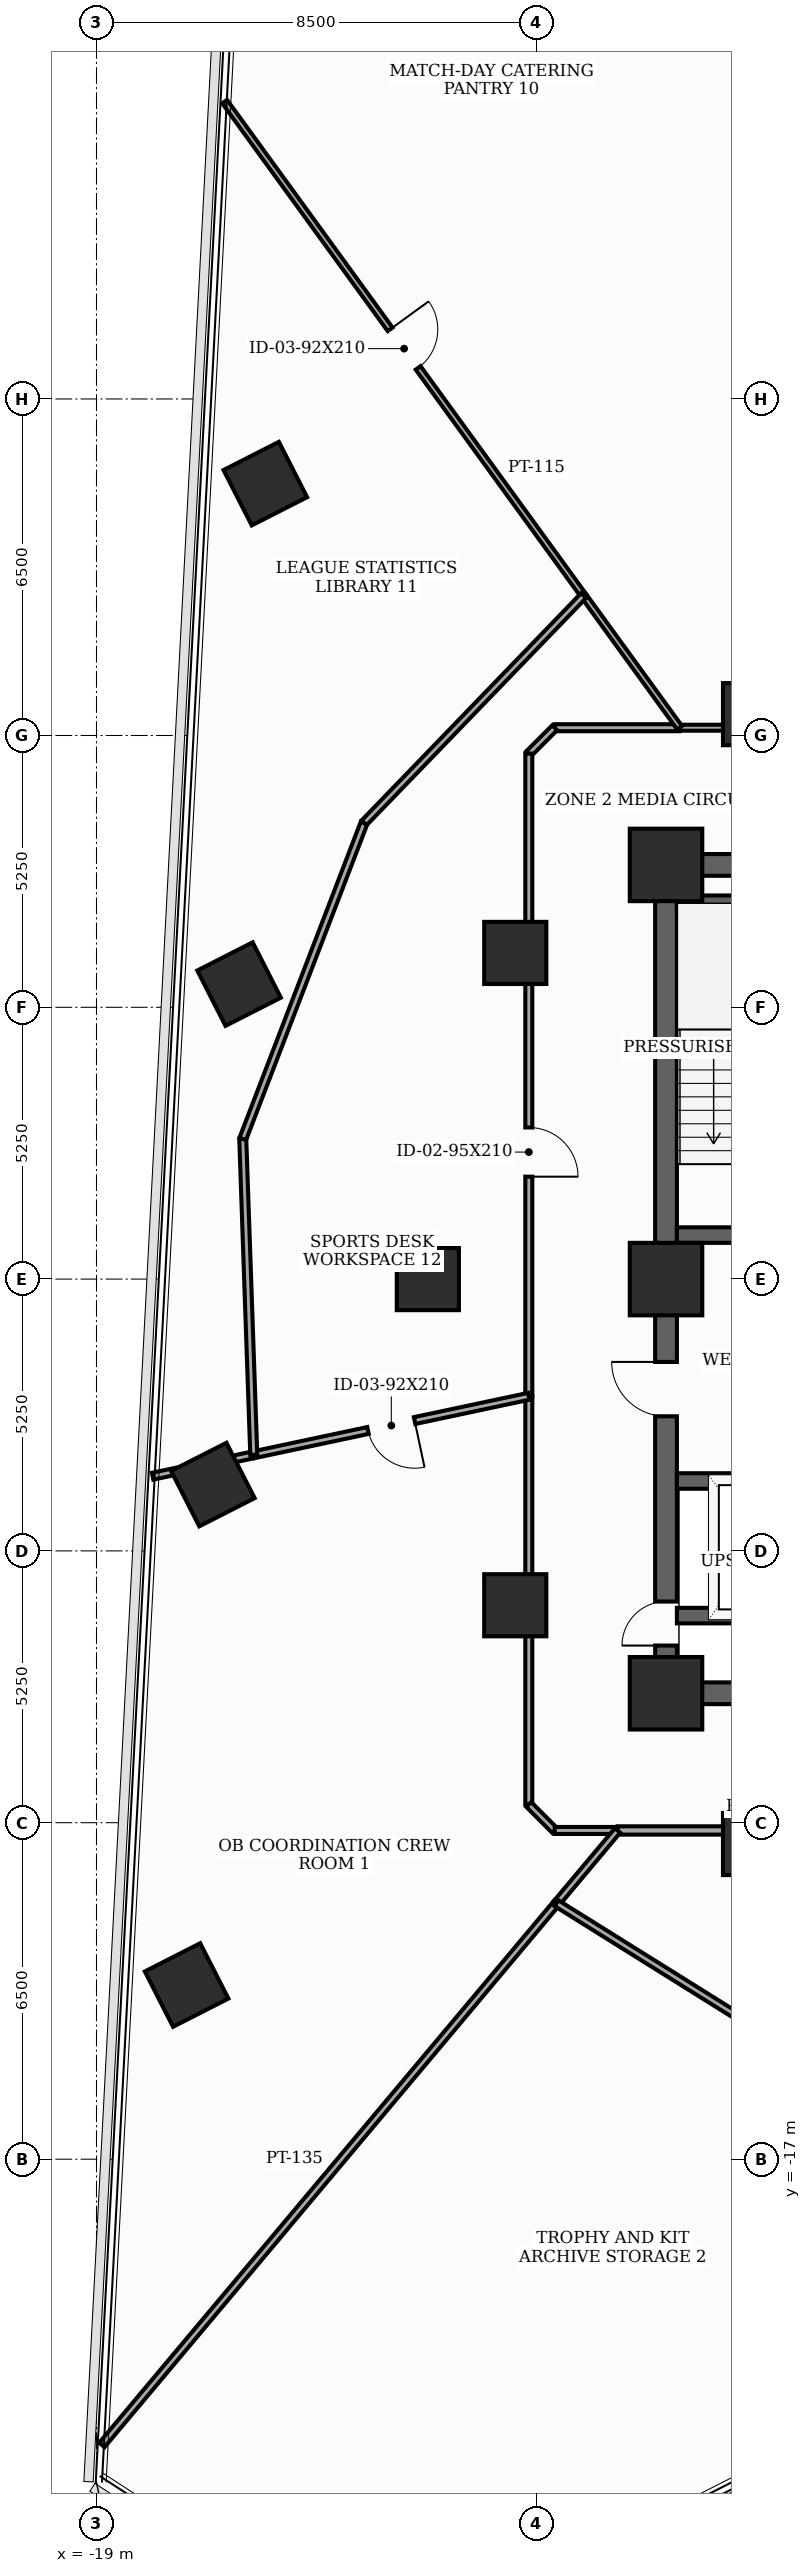
"""IFC4 building model, lengths in metres.
Left out: names, types, materials, properties, quantities, classifications, styles, units other than length and angle.
Written with IfcOpenShell. Run it as: python <this file> out.ifc"""

import sys

from ifc_helpers import new_model, si_unit, direction, frame, frame_2d, origin, origin_2d, place, context, subcontext, project, spatial, rectangle, extrude, element, fill, save


model = new_model("IFC4")
c1 = context("Model", 3, precision=1e-05, world=origin(), true_north=direction((0.0, 1.0)))
c2 = subcontext(c1, "Body", "Model", "MODEL_VIEW")
j1 = project(units=[si_unit("LENGTHUNIT", "METRE"), si_unit("PLANEANGLEUNIT", "RADIAN")], contexts=[c1])
p1 = place(None, origin())
s1 = spatial("IfcSite", under=j1, at=p1, CompositionType="ELEMENT")
p2 = place(p1, origin())
s2 = spatial("IfcBuilding", under=s1, at=p2, CompositionType="ELEMENT")
p3 = place(p2, frame((0.0, 0.0, 127.3)))
s3 = spatial("IfcBuildingStorey", under=s2, at=p3, CompositionType="ELEMENT", Elevation=127.3)
for number, where, z_axis, x_axis in (
    (1, (-8.0, -8.0, 0.0), (0.0, 0.0, 1.0), (1.0, 0.0, 0.0)),
    (2, (-8.0, 8.0, 0.0), (0.0, 0.0, 1.0), (1.0, 0.0, 0.0)),
    (3, (-8.0, 0.0, 0.0), (0.0, 0.0, 1.0), (1.0, 0.0, 0.0)),
):
    element("IfcColumn", number, at=place(p3, frame(where, z_axis=z_axis, x_axis=x_axis)), inside=s3, PredefinedType="COLUMN", context=c2, shape_type="SweptSolid", body=[
        extrude(rectangle(XDim=1.4, YDim=1.4, at=origin_2d()), origin(), (0.0, 0.0, 1.0), 3.7),
    ])
for number, where, z_axis, x_axis in (
    (4, (-6.3, 10.912, 0.0), (0.0, 0.0, 1.0), (1.0, 0.0, 0.0)),
    (5, (-10.912, 6.3, 0.0), (0.0, 0.0, 1.0), (1.0, 0.0, 0.0)),
    (6, (-12.6, 0.0, 0.0), (0.0, 0.0, 1.0), (1.0, 0.0, 0.0)),
    (7, (-10.912, -6.3, 0.0), (0.0, 0.0, 1.0), (1.0, 0.0, 0.0)),
    (8, (-6.3, -10.912, 0.0), (0.0, 0.0, 1.0), (1.0, 0.0, 0.0)),
    (9, (-15.739, 15.365, 0.0), (0.0, 0.0, 1.0), (0.891, 0.454, 0.0)),
    (10, (-16.246, 5.698, 0.0), (0.0, 0.0, 1.0), (0.891, 0.454, 0.0)),
    (11, (-16.752, -3.969, 0.0), (0.0, 0.0, 1.0), (0.891, 0.454, 0.0)),
    (12, (-17.259, -13.635, 0.0), (0.0, 0.0, 1.0), (0.891, 0.454, 0.0)),
):
    element("IfcColumn", number, at=place(p3, frame(where, z_axis=z_axis, x_axis=x_axis)), inside=s3, PredefinedType="COLUMN", context=c2, shape_type="SweptSolid", body=[
        extrude(rectangle(XDim=1.2, YDim=1.2, at=origin_2d()), origin(), (0.0, 0.0, 1.0), 3.7),
    ])
p4 = place(p3, frame((-8.0, -8.0, 0.0), z_axis=(0.0, 0.0, 1.0), x_axis=(0.0, 1.0, 0.0)))
e13 = element("IfcWall", 13, at=p4, inside=s3, PredefinedType="SHEAR", context=c2, shape_type="SweptSolid", body=[
    extrude(rectangle(XDim=16.0, YDim=0.42, at=frame_2d((8.0, 0.0))), origin(), (0.0, 0.0, 1.0), 3.5),
])
p5 = place(p4, frame((0.922, 0.0, 0.0)))
e14 = element("IfcOpeningElement", 14, at=p5, cuts=e13, PredefinedType="OPENING", context=c2, shape_type="SweptSolid", body=[
    extrude(rectangle(XDim=0.85, YDim=2.02, at=frame_2d((0.425, 1.01))), frame((0.0, 0.22, 0.0), z_axis=(0.0, -1.0, 0.0), x_axis=(1.0, 0.0, 0.0)), (0.0, 0.0, 1.0), 0.44),
])
p6 = place(p4, frame((5.35, 0.0, 0.0)))
e15 = element("IfcOpeningElement", 15, at=p6, cuts=e13, PredefinedType="OPENING", context=c2, shape_type="SweptSolid", body=[
    extrude(rectangle(XDim=1.05, YDim=2.15, at=frame_2d((0.525, 1.075))), frame((0.0, 0.22, 0.0), z_axis=(0.0, -1.0, 0.0), x_axis=(1.0, 0.0, 0.0)), (0.0, 0.0, 1.0), 0.44),
])
p7 = place(p3, frame((-8.0, -8.0, 0.0), z_axis=(0.0, 0.0, 1.0), x_axis=(1.0, 0.0, 0.0)))
e16 = element("IfcWall", 16, at=p7, inside=s3, PredefinedType="SHEAR", context=c2, shape_type="SweptSolid", body=[
    extrude(rectangle(XDim=16.0, YDim=0.42, at=frame_2d((8.0, 0.0))), origin(), (0.0, 0.0, 1.0), 3.5),
])
p8 = place(p7, frame((5.2, 0.0, 0.0)))
e17 = element("IfcOpeningElement", 17, at=p8, cuts=e16, PredefinedType="OPENING", context=c2, shape_type="SweptSolid", body=[
    extrude(rectangle(XDim=0.95, YDim=2.1, at=frame_2d((0.475, 1.05))), frame((0.0, 0.22, 0.0), z_axis=(0.0, -1.0, 0.0), x_axis=(1.0, 0.0, 0.0)), (0.0, 0.0, 1.0), 0.44),
])
p9 = place(p7, frame((9.8, 0.0, 0.0)))
e18 = element("IfcOpeningElement", 18, at=p9, cuts=e16, PredefinedType="OPENING", context=c2, shape_type="SweptSolid", body=[
    extrude(rectangle(XDim=0.95, YDim=2.1, at=frame_2d((0.475, 1.05))), frame((0.0, 0.22, 0.0), z_axis=(0.0, -1.0, 0.0), x_axis=(1.0, 0.0, 0.0)), (0.0, 0.0, 1.0), 0.44),
])
p10 = place(p3, frame((-8.0, 8.0, 0.0), z_axis=(0.0, 0.0, 1.0), x_axis=(1.0, 0.0, 0.0)))
e19 = element("IfcWall", 19, at=p10, inside=s3, PredefinedType="SHEAR", context=c2, shape_type="SweptSolid", body=[
    extrude(rectangle(XDim=16.0, YDim=0.42, at=frame_2d((8.0, 0.0))), origin(), (0.0, 0.0, 1.0), 3.5),
])
p11 = place(p10, frame((7.1, 0.0, 0.0)))
e20 = element("IfcOpeningElement", 20, at=p11, cuts=e19, PredefinedType="OPENING", context=c2, shape_type="SweptSolid", body=[
    extrude(rectangle(XDim=1.8, YDim=2.15, at=frame_2d((0.9, 1.075))), frame((0.0, 0.22, 0.0), z_axis=(0.0, -1.0, 0.0), x_axis=(1.0, 0.0, 0.0)), (0.0, 0.0, 1.0), 0.44),
])
p12 = place(p3, frame((-7.79, 0.85, 0.0), z_axis=(0.0, 0.0, 1.0), x_axis=(1.0, 0.0, 0.0)))
e21 = element("IfcWall", 21, at=p12, inside=s3, PredefinedType="SHEAR", context=c2, shape_type="SweptSolid", body=[
    extrude(rectangle(XDim=3.34, YDim=0.3, at=frame_2d((1.67, 0.0))), origin(), (0.0, 0.0, 1.0), 3.5),
])
p13 = place(p12, frame((1.85, 0.0, 0.0)))
e22 = element("IfcOpeningElement", 22, at=p13, cuts=e21, PredefinedType="OPENING", context=c2, shape_type="SweptSolid", body=[
    extrude(rectangle(XDim=1.05, YDim=2.15, at=frame_2d((0.525, 1.075))), frame((0.0, 0.16, 0.0), z_axis=(0.0, -1.0, 0.0), x_axis=(1.0, 0.0, 0.0)), (0.0, 0.0, 1.0), 0.32),
])
p14 = place(p3, frame((-7.79, 7.26, 0.0), z_axis=(0.0, 0.0, 1.0), x_axis=(1.0, 0.0, 0.0)))
e23 = element("IfcWall", 23, at=p14, inside=s3, PredefinedType="SHEAR", context=c2, shape_type="SweptSolid", body=[
    extrude(rectangle(XDim=3.34, YDim=0.3, at=frame_2d((1.67, 0.0))), origin(), (0.0, 0.0, 1.0), 3.5),
])
p15 = place(p3, frame((-7.79, -3.9, 0.0), z_axis=(0.0, 0.0, 1.0), x_axis=(1.0, 0.0, 0.0)))
e24 = element("IfcWall", 24, at=p15, inside=s3, PredefinedType="SHEAR", context=c2, shape_type="SweptSolid", body=[
    extrude(rectangle(XDim=3.34, YDim=0.3, at=frame_2d((1.67, 0.0))), origin(), (0.0, 0.0, 1.0), 3.5),
])
p16 = place(p15, frame((1.27, 0.0, 0.0)))
e25 = element("IfcOpeningElement", 25, at=p16, cuts=e24, PredefinedType="OPENING", context=c2, shape_type="SweptSolid", body=[
    extrude(rectangle(XDim=1.1, YDim=2.1, at=frame_2d((0.55, 1.05))), frame((0.0, 0.16, 0.0), z_axis=(0.0, -1.0, 0.0), x_axis=(1.0, 0.0, 0.0)), (0.0, 0.0, 1.0), 0.32),
])
p17 = place(p3, frame((-7.79, -6.5, 0.0), z_axis=(0.0, 0.0, 1.0), x_axis=(1.0, 0.0, 0.0)))
e26 = element("IfcWall", 26, at=p17, inside=s3, PredefinedType="SHEAR", context=c2, shape_type="SweptSolid", body=[
    extrude(rectangle(XDim=3.34, YDim=0.3, at=frame_2d((1.67, 0.0))), origin(), (0.0, 0.0, 1.0), 3.5),
])
p18 = place(p3, frame((-10.65, -2.264, 0.0), z_axis=(0.0, 0.0, 1.0), x_axis=(0.0, -1.0, 0.0)))
e27 = element("IfcWall", 27, at=p18, inside=s3, PredefinedType="PARTITIONING", context=c2, shape_type="SweptSolid", body=[
    extrude(rectangle(XDim=7.886, YDim=0.135, at=frame_2d((3.943, 0.0))), origin(), (0.0, 0.0, 1.0), 2.785),
])
p19 = place(p3, frame((-10.65, -10.15, 0.0), z_axis=(0.0, 0.0, 1.0), x_axis=(0.707106781187, -0.707106781187, 0.0)))
e28 = element("IfcWall", 28, at=p19, inside=s3, PredefinedType="PARTITIONING", context=c2, shape_type="SweptSolid", body=[
    extrude(rectangle(XDim=0.707, YDim=0.135, at=frame_2d((0.354, 0.0))), origin(), (0.0, 0.0, 1.0), 3.5),
])
p20 = place(p3, frame((-10.15, -10.65, 0.0), z_axis=(0.0, 0.0, 1.0), x_axis=(1.0, 0.0, 0.0)))
e29 = element("IfcWall", 29, at=p20, inside=s3, PredefinedType="PARTITIONING", context=c2, shape_type="SweptSolid", body=[
    extrude(rectangle(XDim=1.214, YDim=0.135, at=frame_2d((0.607, 0.0))), origin(), (0.0, 0.0, 1.0), 3.5),
])
p21 = place(p3, frame((-8.936, -10.65, 0.0), z_axis=(0.0, 0.0, 1.0), x_axis=(1.0, 0.0, 0.0)))
e30 = element("IfcWall", 30, at=p21, inside=s3, PredefinedType="PARTITIONING", context=c2, shape_type="SweptSolid", body=[
    extrude(rectangle(XDim=11.591, YDim=0.16, at=frame_2d((5.795, 0.0))), origin(), (0.0, 0.0, 1.0), 2.785),
])
p22 = place(p21, frame((5.295, 0.0, 0.0)))
e31 = element("IfcOpeningElement", 31, at=p22, cuts=e30, PredefinedType="OPENING", context=c2, shape_type="SweptSolid", body=[
    extrude(rectangle(XDim=1.0, YDim=2.15, at=frame_2d((0.5, 1.075))), frame((0.0, 0.09, 0.0), z_axis=(0.0, -1.0, 0.0), x_axis=(1.0, 0.0, 0.0)), (0.0, 0.0, 1.0), 0.18),
])
p23 = place(p3, frame((-2.264, 10.65, 0.0), z_axis=(0.0, 0.0, 1.0), x_axis=(-1.0, 0.0, 0.0)))
e32 = element("IfcWall", 32, at=p23, inside=s3, PredefinedType="PARTITIONING", context=c2, shape_type="SweptSolid", body=[
    extrude(rectangle(XDim=5.474, YDim=0.115, at=frame_2d((2.737, 0.0))), origin(), (0.0, 0.0, 1.0), 2.785),
])
p24 = place(p23, frame((0.62, 0.0, 0.0)))
e33 = element("IfcOpeningElement", 33, at=p24, cuts=e32, PredefinedType="OPENING", context=c2, shape_type="SweptSolid", body=[
    extrude(rectangle(XDim=0.95, YDim=2.1, at=frame_2d((0.475, 1.05))), frame((0.0, 0.067, 0.0), z_axis=(0.0, -1.0, 0.0), x_axis=(1.0, 0.0, 0.0)), (0.0, 0.0, 1.0), 0.135),
])
p25 = place(p3, frame((-7.738, 10.65, 0.0), z_axis=(0.0, 0.0, 1.0), x_axis=(-1.0, 0.0, 0.0)))
e34 = element("IfcWall", 34, at=p25, inside=s3, PredefinedType="PARTITIONING", context=c2, shape_type="SweptSolid", body=[
    extrude(rectangle(XDim=2.412, YDim=0.135, at=frame_2d((1.206, 0.0))), origin(), (0.0, 0.0, 1.0), 3.5),
])
p26 = place(p3, frame((-10.15, 10.65, 0.0), z_axis=(0.0, 0.0, 1.0), x_axis=(-0.707106781187, -0.707106781187, 0.0)))
e35 = element("IfcWall", 35, at=p26, inside=s3, PredefinedType="PARTITIONING", context=c2, shape_type="SweptSolid", body=[
    extrude(rectangle(XDim=0.707, YDim=0.135, at=frame_2d((0.354, 0.0))), origin(), (0.0, 0.0, 1.0), 3.5),
])
p27 = place(p3, frame((-10.65, 10.15, 0.0), z_axis=(0.0, 0.0, 1.0), x_axis=(0.0, -1.0, 0.0)))
e36 = element("IfcWall", 36, at=p27, inside=s3, PredefinedType="PARTITIONING", context=c2, shape_type="SweptSolid", body=[
    extrude(rectangle(XDim=12.414, YDim=0.135, at=frame_2d((6.207, 0.0))), origin(), (0.0, 0.0, 1.0), 2.785),
])
p28 = place(p27, frame((7.222, 0.0, 0.0)))
e37 = element("IfcOpeningElement", 37, at=p28, cuts=e36, PredefinedType="OPENING", context=c2, shape_type="SweptSolid", body=[
    extrude(rectangle(XDim=0.95, YDim=2.1, at=frame_2d((0.475, 1.05))), frame((0.0, 0.077, 0.0), z_axis=(0.0, -1.0, 0.0), x_axis=(1.0, 0.0, 0.0)), (0.0, 0.0, 1.0), 0.155),
])
p29 = place(p3, frame((-18.896, -22.52, 0.0), z_axis=(0.0, 0.0, 1.0), x_axis=(0.642815636807, 0.766020924698, 0.0)))
e38 = element("IfcWall", 38, at=p29, inside=s3, PredefinedType="PARTITIONING", context=c2, shape_type="SweptSolid", body=[
    extrude(rectangle(XDim=13.661, YDim=0.135, at=frame_2d((6.831, 0.0))), origin(), (0.0, 0.0, 1.0), 2.985),
])
p30 = place(p3, frame((-10.115, -12.055, 0.0), z_axis=(0.0, 0.0, 1.0), x_axis=(0.64278617419, 0.766045647642, 0.0)))
e39 = element("IfcWall", 39, at=p30, inside=s3, PredefinedType="PARTITIONING", context=c2, shape_type="SweptSolid", body=[
    extrude(rectangle(XDim=1.834, YDim=0.135, at=frame_2d((0.917, 0.0))), origin(), (0.0, 0.0, 1.0), 3.5),
])
p31 = place(p3, frame((-15.962, -3.393, 0.0), z_axis=(0.0, 0.0, 1.0), x_axis=(-0.978224349737, -0.207550286874, 0.0)))
e40 = element("IfcWall", 40, at=p31, inside=s3, PredefinedType="PARTITIONING", context=c2, shape_type="SweptSolid", body=[
    extrude(rectangle(XDim=1.997, YDim=0.135, at=frame_2d((0.999, 0.0))), origin(), (0.0, 0.0, 1.0), 2.885),
])
p32 = place(p3, frame((-10.65, -2.264, 0.0), z_axis=(0.0, 0.0, 1.0), x_axis=(-0.978145824013, -0.207920049456, 0.0)))
e41 = element("IfcWall", 41, at=p32, inside=s3, PredefinedType="PARTITIONING", context=c2, shape_type="SweptSolid", body=[
    extrude(rectangle(XDim=5.431, YDim=0.135, at=frame_2d((2.715, 0.0))), origin(), (0.0, 0.0, 1.0), 2.785),
])
p33 = place(p32, frame((2.255, 0.0, 0.0)))
e42 = element("IfcOpeningElement", 42, at=p33, cuts=e41, PredefinedType="OPENING", context=c2, shape_type="SweptSolid", body=[
    extrude(rectangle(XDim=0.92, YDim=2.1, at=frame_2d((0.46, 1.05))), frame((0.0, 0.077, 0.0), z_axis=(0.0, -1.0, 0.0), x_axis=(1.0, 0.0, 0.0)), (0.0, 0.0, 1.0), 0.155),
])
p34 = place(p3, frame((-6.046, -14.597, 0.0), z_axis=(0.0, 0.0, 1.0), x_axis=(-0.848109776096, 0.529820542912, 0.0)))
e43 = element("IfcWall", 43, at=p34, inside=s3, PredefinedType="PARTITIONING", context=c2, shape_type="SweptSolid", body=[
    extrude(rectangle(XDim=4.798, YDim=0.135, at=frame_2d((2.399, 0.0))), origin(), (0.0, 0.0, 1.0), 3.5),
])
p35 = place(p3, frame((-16.524, 22.743, 0.0), z_axis=(0.0, 0.0, 1.0), x_axis=(0.587785136625, -0.809017078412, 0.0)))
e44 = element("IfcWall", 44, at=p35, inside=s3, PredefinedType="PARTITIONING", context=c2, shape_type="SweptSolid", body=[
    extrude(rectangle(XDim=11.794, YDim=0.115, at=frame_2d((5.897, 0.0))), origin(), (0.0, 0.0, 1.0), 2.985),
])
p36 = place(p35, frame((5.437, 0.0, 0.0)))
e45 = element("IfcOpeningElement", 45, at=p36, cuts=e44, PredefinedType="OPENING", context=c2, shape_type="SweptSolid", body=[
    extrude(rectangle(XDim=0.92, YDim=2.1, at=frame_2d((0.46, 1.05))), frame((0.0, 0.067, 0.0), z_axis=(0.0, -1.0, 0.0), x_axis=(1.0, 0.0, 0.0)), (0.0, 0.0, 1.0), 0.135),
])
p37 = place(p3, frame((-9.592, 13.202, 0.0), z_axis=(0.0, 0.0, 1.0), x_axis=(0.587757438745, -0.80903720137, 0.0)))
e46 = element("IfcWall", 46, at=p37, inside=s3, PredefinedType="PARTITIONING", context=c2, shape_type="SweptSolid", body=[
    extrude(rectangle(XDim=3.154, YDim=0.115, at=frame_2d((1.577, 0.0))), origin(), (0.0, 0.0, 1.0), 3.5),
])
p38 = place(p3, frame((-15.962, -3.393, 0.0), z_axis=(0.0, 0.0, 1.0), x_axis=(-0.034918259019, 0.999390171648, 0.0)))
e47 = element("IfcWall", 47, at=p38, inside=s3, PredefinedType="PARTITIONING", context=c2, shape_type="SweptSolid", body=[
    extrude(rectangle(XDim=6.104, YDim=0.135, at=frame_2d((3.052, 0.0))), origin(), (0.0, 0.0, 1.0), 2.885),
])
p39 = place(p3, frame((-16.175, 2.707, 0.0), z_axis=(0.0, 0.0, 1.0), x_axis=(0.358305989998, 0.93360420818, 0.0)))
e48 = element("IfcWall", 48, at=p39, inside=s3, PredefinedType="PARTITIONING", context=c2, shape_type="SweptSolid", body=[
    extrude(rectangle(XDim=6.539, YDim=0.135, at=frame_2d((3.27, 0.0))), origin(), (0.0, 0.0, 1.0), 2.885),
])
p40 = place(p3, frame((-13.832, 8.812, 0.0), z_axis=(0.0, 0.0, 1.0), x_axis=(0.694719433394, 0.719280827538, 0.0)))
e49 = element("IfcWall", 49, at=p40, inside=s3, PredefinedType="PARTITIONING", context=c2, shape_type="SweptSolid", body=[
    extrude(rectangle(XDim=6.103, YDim=0.135, at=frame_2d((3.052, 0.0))), origin(), (0.0, 0.0, 1.0), 2.885),
])
p41 = place(p5, origin())
e50 = element("IfcDoor", 50, at=p41, inside=s3, OperationType="SINGLE_SWING_LEFT", PredefinedType="TRAPDOOR", context=c2, shape_type="SweptSolid", body=[
    extrude(rectangle(XDim=0.85, YDim=2.02, at=frame_2d((0.425, 1.01))), frame((0.0, 0.025, 0.0), z_axis=(0.0, -1.0, 0.0), x_axis=(1.0, 0.0, 0.0)), (0.0, 0.0, 1.0), 0.05),
])
fill(e14, e50)
p42 = place(p6, origin())
e51 = element("IfcDoor", 51, at=p42, inside=s3, OperationType="SINGLE_SWING_RIGHT", PredefinedType="DOOR", context=c2, shape_type="SweptSolid", body=[
    extrude(rectangle(XDim=1.05, YDim=2.15, at=frame_2d((0.525, 1.075))), frame((0.0, 0.025, 0.0), z_axis=(0.0, -1.0, 0.0), x_axis=(1.0, 0.0, 0.0)), (0.0, 0.0, 1.0), 0.05),
])
fill(e15, e51)
p43 = place(p28, origin())
e52 = element("IfcDoor", 52, at=p43, inside=s3, OperationType="SINGLE_SWING_RIGHT", PredefinedType="DOOR", context=c2, shape_type="SweptSolid", body=[
    extrude(rectangle(XDim=0.95, YDim=2.1, at=frame_2d((0.475, 1.05))), frame((0.0, 0.025, 0.0), z_axis=(0.0, -1.0, 0.0), x_axis=(1.0, 0.0, 0.0)), (0.0, 0.0, 1.0), 0.05),
])
fill(e37, e52)
p44 = place(p33, origin())
e53 = element("IfcDoor", 53, at=p44, inside=s3, OperationType="SINGLE_SWING_LEFT", PredefinedType="DOOR", context=c2, shape_type="SweptSolid", body=[
    extrude(rectangle(XDim=0.92, YDim=2.1, at=frame_2d((0.46, 1.05))), frame((0.0, 0.025, 0.0), z_axis=(0.0, -1.0, 0.0), x_axis=(1.0, 0.0, 0.0)), (0.0, 0.0, 1.0), 0.05),
])
fill(e42, e53)
p45 = place(p36, origin())
e54 = element("IfcDoor", 54, at=p45, inside=s3, OperationType="SINGLE_SWING_LEFT", PredefinedType="DOOR", context=c2, shape_type="SweptSolid", body=[
    extrude(rectangle(XDim=0.92, YDim=2.1, at=frame_2d((0.46, 1.05))), frame((0.0, 0.025, 0.0), z_axis=(0.0, -1.0, 0.0), x_axis=(1.0, 0.0, 0.0)), (0.0, 0.0, 1.0), 0.05),
])
fill(e45, e54)
save(model, sys.argv[1])
